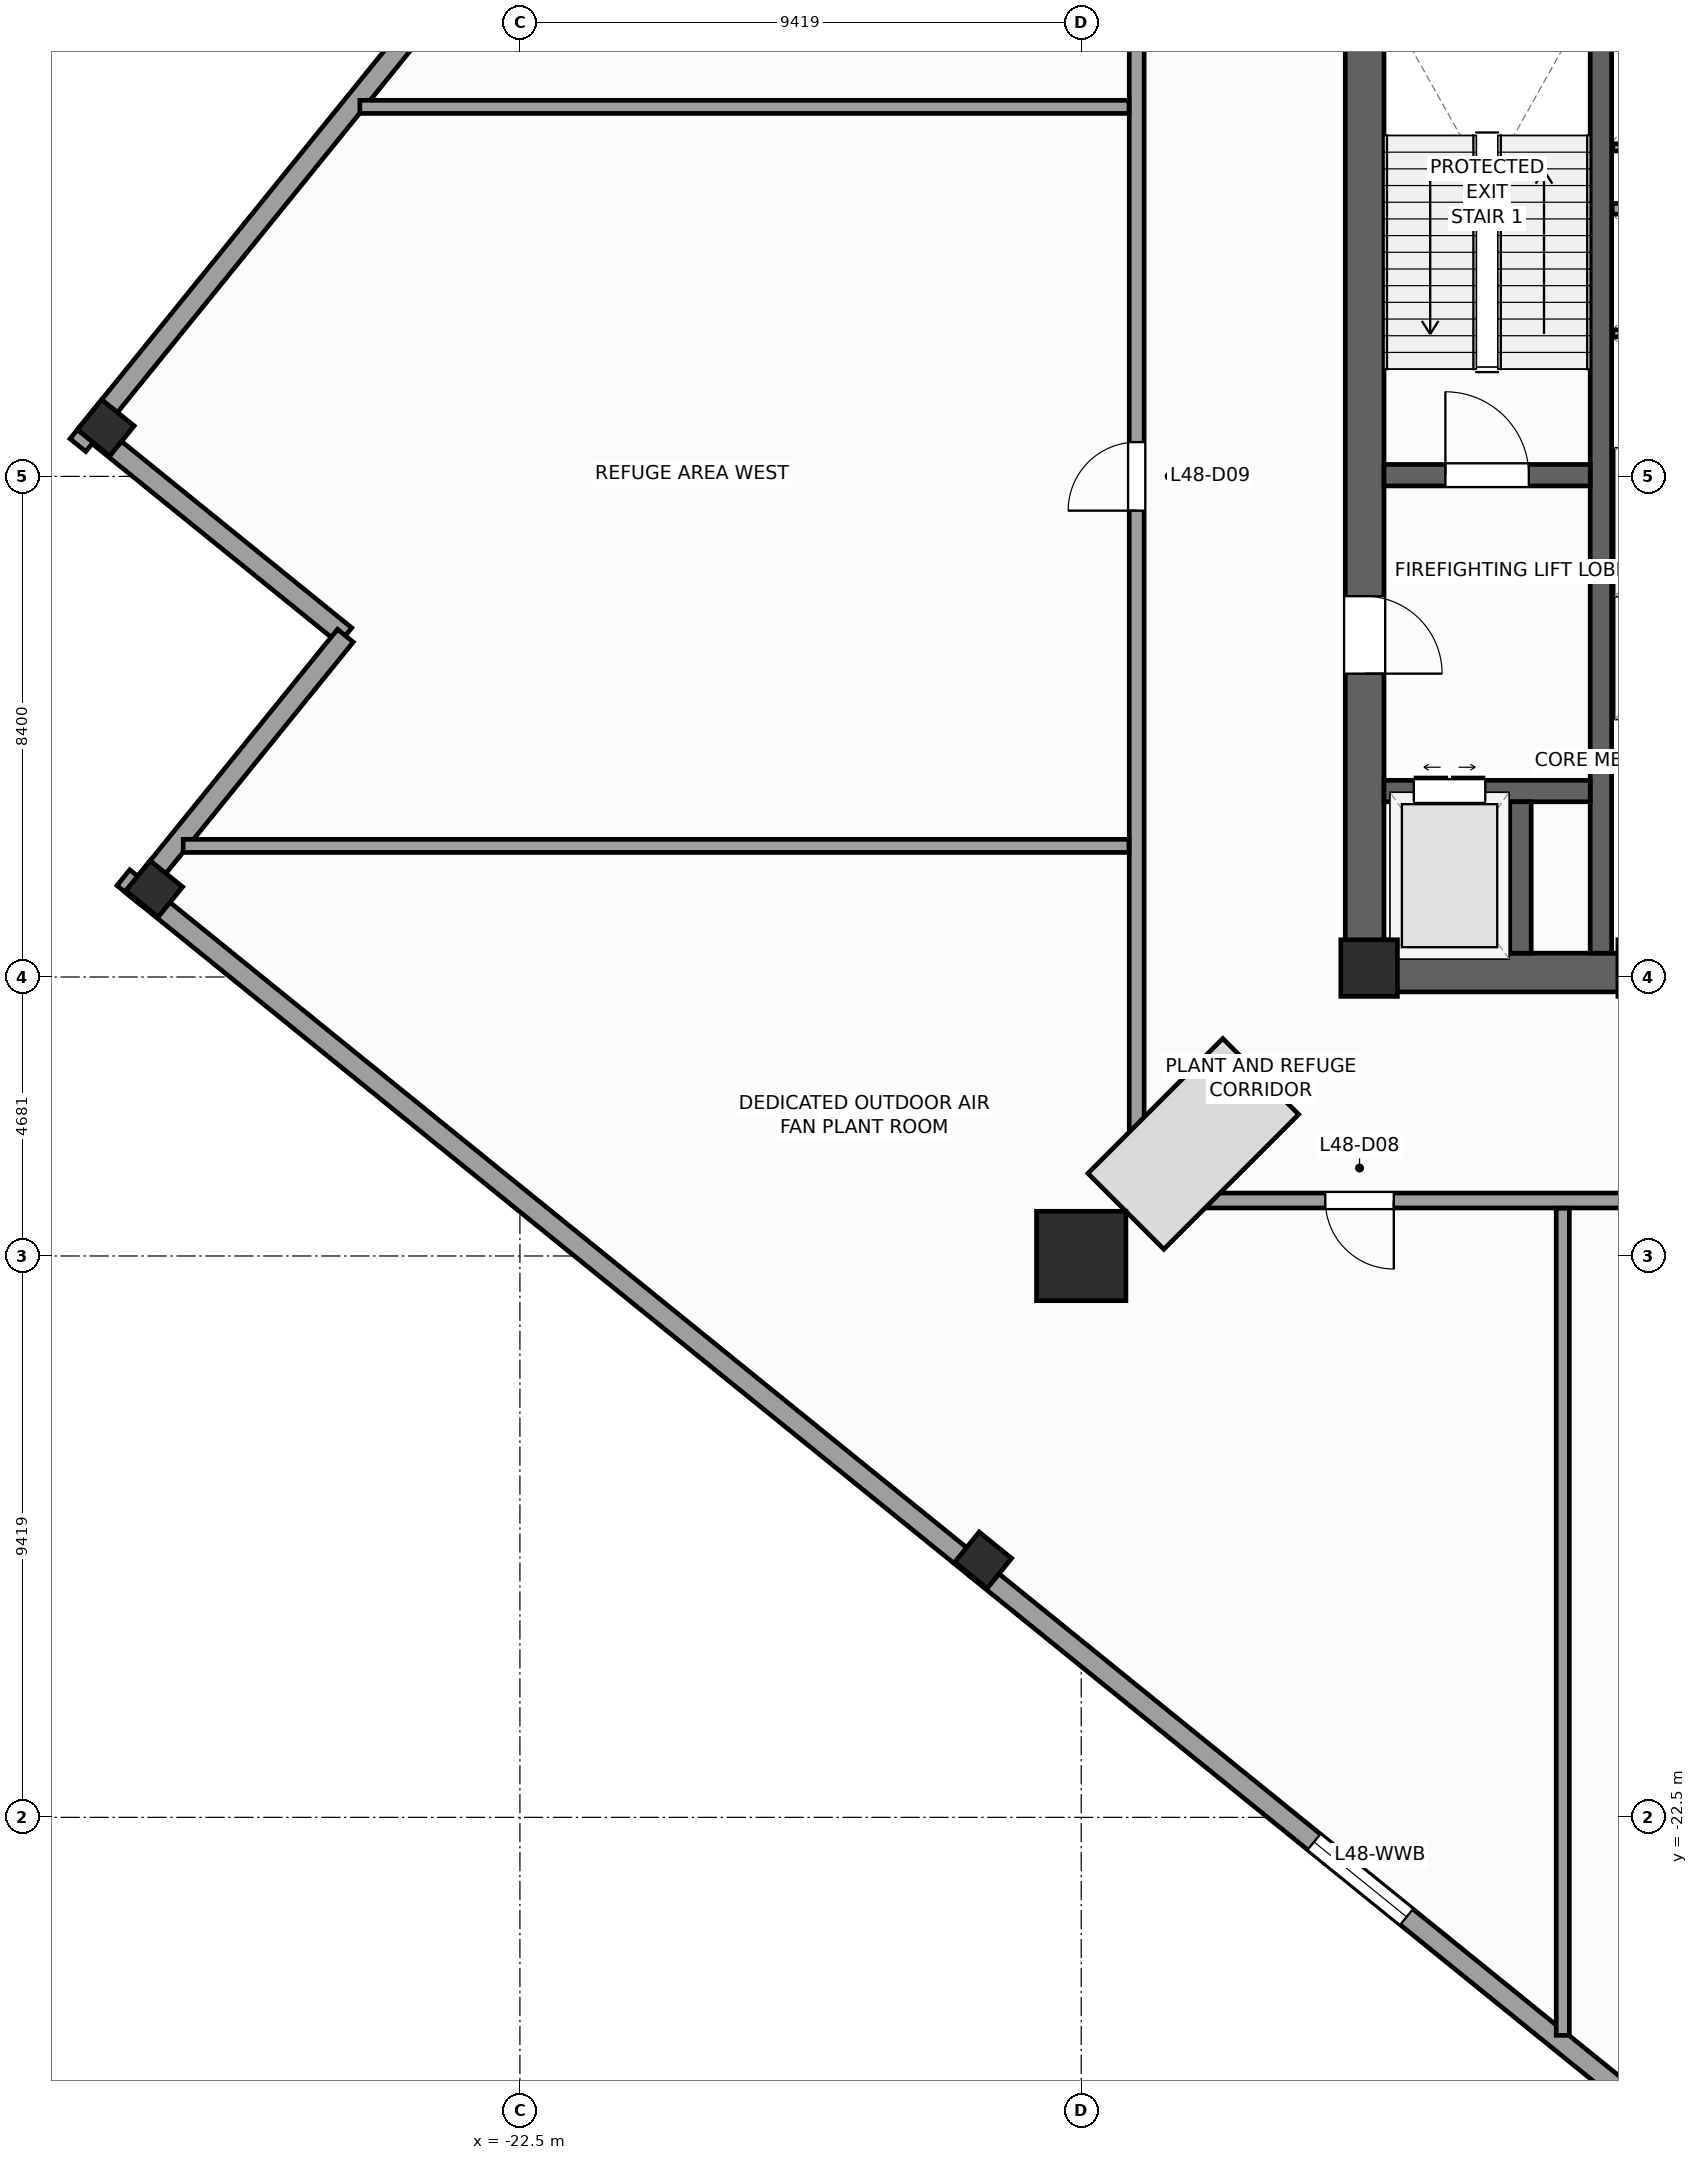
"""IFC4 building model, lengths in metres.
Left out: names, types, materials, properties, quantities, classifications, styles, units other than length and angle.
Written with IfcOpenShell. Run it as: python <this file> out.ifc"""

import sys

from ifc_helpers import new_model, si_unit, direction, frame, frame_2d, origin, origin_2d, place, context, subcontext, project, spatial, rectangle, extrude, source, transform, mapped, element, fill, save


model = new_model("IFC4")
c1 = context("Model", 3, precision=1e-05, world=origin(), true_north=direction((0.0, 1.0)))
c2 = subcontext(c1, "Body", "Model", "MODEL_VIEW")
j1 = project(units=[si_unit("LENGTHUNIT", "METRE"), si_unit("PLANEANGLEUNIT", "RADIAN")], contexts=[c1])
p1 = place(None, origin())
s1 = spatial("IfcSite", under=j1, at=p1, CompositionType="ELEMENT")
p2 = place(p1, origin())
s2 = spatial("IfcBuilding", under=s1, at=p2, CompositionType="ELEMENT")
p3 = place(p2, frame((0.0, 0.0, 200.4)))
s3 = spatial("IfcBuildingStorey", under=s2, at=p3, CompositionType="ELEMENT", Elevation=200.4)
p4 = place(p3, frame((-8.65, -8.325, 0.0), z_axis=(0.0, 0.0, 1.0), x_axis=(1.0, 0.0, 0.0)))
e1 = element("IfcWall", 1, at=p4, inside=s3, PredefinedType="SHEAR", context=c2, shape_type="SweptSolid", body=[
    extrude(rectangle(XDim=17.3, YDim=0.65, at=frame_2d((8.65, 0.0))), origin(), (0.0, 0.0, 1.0), 5.2),
])
p5 = place(p4, frame((8.0, 0.0, 0.0)))
e2 = element("IfcOpeningElement", 2, at=p5, cuts=e1, PredefinedType="OPENING", context=c2, shape_type="SweptSolid", body=[
    extrude(rectangle(XDim=1.3, YDim=2.2, at=frame_2d((0.65, 1.1))), frame((0.0, 0.335, 0.0), z_axis=(0.0, -1.0, 0.0), x_axis=(1.0, 0.0, 0.0)), (0.0, 0.0, 1.0), 0.67),
])
p6 = place(p3, frame((-8.325, -8.0, 0.0), z_axis=(0.0, 0.0, 1.0), x_axis=(0.0, 1.0, 0.0)))
e3 = element("IfcWall", 3, at=p6, inside=s3, PredefinedType="SHEAR", context=c2, shape_type="SweptSolid", body=[
    extrude(rectangle(XDim=16.0, YDim=0.65, at=frame_2d((8.0, 0.0))), origin(), (0.0, 0.0, 1.0), 5.2),
])
p7 = place(p6, frame((4.69, 0.0, 0.0)))
e4 = element("IfcOpeningElement", 4, at=p7, cuts=e3, PredefinedType="OPENING", context=c2, shape_type="SweptSolid", body=[
    extrude(rectangle(XDim=1.3, YDim=2.2, at=frame_2d((0.65, 1.1))), frame((0.0, 0.335, 0.0), z_axis=(0.0, -1.0, 0.0), x_axis=(1.0, 0.0, 0.0)), (0.0, 0.0, 1.0), 0.67),
])
p8 = place(p3, frame((-4.36, -8.0, 0.0), z_axis=(0.0, 0.0, 1.0), x_axis=(0.0, 1.0, 0.0)))
e5 = element("IfcWall", 5, at=p8, inside=s3, PredefinedType="SHEAR", context=c2, shape_type="SweptSolid", body=[
    extrude(rectangle(XDim=16.0, YDim=0.36, at=frame_2d((8.0, 0.0))), origin(), (0.0, 0.0, 1.0), 5.2),
])
p9 = place(p3, frame((-8.0, 0.02, 0.0), z_axis=(0.0, 0.0, 1.0), x_axis=(1.0, 0.0, 0.0)))
e6 = element("IfcWall", 6, at=p9, inside=s3, PredefinedType="SHEAR", context=c2, shape_type="SweptSolid", body=[
    extrude(rectangle(XDim=3.46, YDim=0.36, at=frame_2d((1.73, 0.0))), origin(), (0.0, 0.0, 1.0), 5.2),
])
p10 = place(p9, frame((1.03, 0.0, 0.0)))
e7 = element("IfcOpeningElement", 7, at=p10, cuts=e6, PredefinedType="OPENING", context=c2, shape_type="SweptSolid", body=[
    extrude(rectangle(XDim=1.4, YDim=2.2, at=frame_2d((0.7, 1.1))), frame((0.0, 0.19, 0.0), z_axis=(0.0, -1.0, 0.0), x_axis=(1.0, 0.0, 0.0)), (0.0, 0.0, 1.0), 0.38),
])
p11 = place(p3, frame((-8.0, -5.28, 0.0), z_axis=(0.0, 0.0, 1.0), x_axis=(1.0, 0.0, 0.0)))
e8 = element("IfcWall", 8, at=p11, inside=s3, PredefinedType="SHEAR", context=c2, shape_type="SweptSolid", body=[
    extrude(rectangle(XDim=3.46, YDim=0.36, at=frame_2d((1.73, 0.0))), origin(), (0.0, 0.0, 1.0), 5.2),
])
p12 = place(p11, frame((0.5, 0.0, 0.0)))
e9 = element("IfcOpeningElement", 9, at=p12, cuts=e8, PredefinedType="OPENING", context=c2, shape_type="SweptSolid", body=[
    extrude(rectangle(XDim=1.2, YDim=2.25, at=frame_2d((0.6, 1.125))), frame((0.0, 0.19, 0.0), z_axis=(0.0, -1.0, 0.0), x_axis=(1.0, 0.0, 0.0)), (0.0, 0.0, 1.0), 0.38),
])
p13 = place(p3, frame((-5.71, -8.0, 0.0), z_axis=(0.0, 0.0, 1.0), x_axis=(0.0, 1.0, 0.0)))
e10 = element("IfcWall", 10, at=p13, inside=s3, PredefinedType="SHEAR", context=c2, shape_type="SweptSolid", body=[
    extrude(rectangle(XDim=2.54, YDim=0.36, at=frame_2d((1.27, 0.0))), origin(), (0.0, 0.0, 1.0), 5.2),
])
m1 = source(origin(), c2, "Body", "SweptSolid", [
    extrude(rectangle(XDim=0.95, YDim=0.95, at=origin_2d()), origin(), (0.0, 0.0, 1.0), 5.2),
])
p14 = place(p3, frame((-8.25, -8.25, 0.0), z_axis=(0.0, 0.0, 1.0), x_axis=(1.0, 0.0, 0.0)))
e11 = element("IfcColumn", 11, at=p14, inside=s3, PredefinedType="PILASTER", context=c2, shape_type="MappedRepresentation", body=[
    mapped(m1, transform((0.0, 0.0, 0.0), scale=1.0)),
])
m2 = source(origin(), c2, "Body", "SweptSolid", [
    extrude(rectangle(XDim=1.5, YDim=1.5, at=origin_2d()), origin(), (0.0, 0.0, 1.0), 5.2),
])
p15 = place(p3, frame((-13.081, -13.081, 0.0), z_axis=(0.0, 0.0, 1.0), x_axis=(1.0, 0.0, 0.0)))
e12 = element("IfcColumn", 12, at=p15, inside=s3, PredefinedType="COLUMN", context=c2, shape_type="MappedRepresentation", body=[
    mapped(m2, transform((0.0, 0.0, 0.0), scale=1.0)),
])
m3 = source(origin(), c2, "Body", "SweptSolid", [
    extrude(rectangle(XDim=0.65, YDim=0.7, at=origin_2d()), origin(), (0.0, 0.0, 1.0), 5.2),
])
for number, where, z_axis, x_axis in (
    (13, (-29.45, 0.815, 0.0), (0.0, 0.0, 1.0), (0.629, 0.777, 0.0)),
    (14, (-28.637, -6.92, 0.0), (0.0, 0.0, 1.0), (0.629, 0.777, 0.0)),
    (15, (-14.726, -18.185, 0.0), (0.0, 0.0, 1.0), (0.629, 0.777, 0.0)),
):
    element("IfcColumn", number, at=place(p3, frame(where, z_axis=z_axis, x_axis=x_axis)), inside=s3, PredefinedType="COLUMN", context=c2, shape_type="MappedRepresentation", body=[
        mapped(m3, transform((0.0, 0.0, 0.0), scale=1.0)),
    ])
p16 = place(p3, frame((-29.703, 0.789, 0.0), z_axis=(0.0, 0.0, 1.0), x_axis=(0.77714355312, -0.629323365087, 0.0)))
e16 = element("IfcWall", 16, at=p16, inside=s3, PredefinedType="STANDARD", context=c2, shape_type="SweptSolid", body=[
    extrude(rectangle(XDim=5.5, YDim=0.34, at=frame_2d((2.75, 0.0))), origin(), (0.0, 0.0, 1.0), 4.96),
])
p17 = place(p3, frame((-25.429, -2.673, 0.0), z_axis=(0.0, 0.0, 1.0), x_axis=(-0.629299794138, -0.777162640055, 0.0)))
e17 = element("IfcWall", 17, at=p17, inside=s3, PredefinedType="STANDARD", context=c2, shape_type="SweptSolid", body=[
    extrude(rectangle(XDim=5.67, YDim=0.34, at=frame_2d((2.835, 0.0))), origin(), (0.0, 0.0, 1.0), 4.96),
])
p18 = place(p3, frame((-17.696, 15.616, 0.0), z_axis=(0.0, 0.0, 1.0), x_axis=(-0.629324798011, -0.777142392749, 0.0)))
e18 = element("IfcWall", 18, at=p18, inside=s3, PredefinedType="STANDARD", context=c2, shape_type="SweptSolid", body=[
    extrude(rectangle(XDim=19.42, YDim=0.34, at=frame_2d((9.71, 0.0))), origin(), (0.0, 0.0, 1.0), 4.26),
])
p19 = place(p18, frame((7.739, 0.0, 0.65)))
e19 = element("IfcOpeningElement", 19, at=p19, cuts=e18, PredefinedType="OPENING", context=c2, shape_type="SweptSolid", body=[
    extrude(rectangle(XDim=2.0, YDim=1.45, at=frame_2d((1.0, 0.725))), frame((0.0, 0.18, 0.0), z_axis=(0.0, -1.0, 0.0), x_axis=(1.0, 0.0, 0.0)), (0.0, 0.0, 1.0), 0.36),
])
p20 = place(p3, frame((-29.154, -6.733, 0.0), z_axis=(0.0, 0.0, 1.0), x_axis=(0.777138681893, -0.629329380456, 0.0)))
e20 = element("IfcWall", 20, at=p20, inside=s3, PredefinedType="STANDARD", context=c2, shape_type="SweptSolid", body=[
    extrude(rectangle(XDim=18.42, YDim=0.34, at=frame_2d((9.21, 0.0))), origin(), (0.0, 0.0, 1.0), 4.26),
])
p21 = place(p3, frame((-14.839, -18.325, 0.0), z_axis=(0.0, 0.0, 1.0), x_axis=(0.777145164153, -0.629321375637, 0.0)))
e21 = element("IfcWall", 21, at=p21, inside=s3, PredefinedType="STANDARD", context=c2, shape_type="SweptSolid", body=[
    extrude(rectangle(XDim=18.42, YDim=0.34, at=frame_2d((9.21, 0.0))), origin(), (0.0, 0.0, 1.0), 4.26),
])
p22 = place(p21, frame((7.289, 0.0, 0.65)))
e22 = element("IfcOpeningElement", 22, at=p22, cuts=e21, PredefinedType="OPENING", context=c2, shape_type="SweptSolid", body=[
    extrude(rectangle(XDim=2.0, YDim=1.45, at=frame_2d((1.0, 0.725))), frame((0.0, 0.18, 0.0), z_axis=(0.0, -1.0, 0.0), x_axis=(1.0, 0.0, 0.0)), (0.0, 0.0, 1.0), 0.36),
])
for number, where, z_axis, x_axis in (
    (23, (-4.17, -3.9, 0.0), (0.0, 0.0, 1.0), (1.0, 0.0, 0.0)),
    (24, (-4.17, 0.3, 0.0), (0.0, 0.0, 1.0), (1.0, 0.0, 0.0)),
    (25, (-4.17, 4.49, 0.0), (0.0, 0.0, 1.0), (1.0, 0.0, 0.0)),
):
    element("IfcWall", number, at=place(p3, frame(where, z_axis=z_axis, x_axis=x_axis)), inside=s3, PredefinedType="PARTITIONING", context=c2, shape_type="SweptSolid", body=[
        extrude(rectangle(XDim=2.28, YDim=0.18, at=frame_2d((1.14, 0.0))), origin(), (0.0, 0.0, 1.0), 4.96),
    ])
for number, where, z_axis, x_axis in (
    (26, (-4.16, -1.8, 0.0), (0.0, 0.0, 1.0), (1.0, 0.0, 0.0)),
    (27, (-4.16, 2.4, 0.0), (0.0, 0.0, 1.0), (1.0, 0.0, 0.0)),
):
    element("IfcWall", number, at=place(p3, frame(where, z_axis=z_axis, x_axis=x_axis)), inside=s3, PredefinedType="PARTITIONING", context=c2, shape_type="SweptSolid", body=[
        extrude(rectangle(XDim=2.26, YDim=0.12, at=frame_2d((1.13, 0.0))), origin(), (0.0, 0.0, 1.0), 4.96),
    ])
p23 = place(p3, frame((-4.16, 5.52, 0.0), z_axis=(0.0, 0.0, 1.0), x_axis=(1.0, 0.0, 0.0)))
e28 = element("IfcWall", 28, at=p23, inside=s3, PredefinedType="PARTITIONING", context=c2, shape_type="SweptSolid", body=[
    extrude(rectangle(XDim=2.1, YDim=0.12, at=frame_2d((1.05, 0.0))), origin(), (0.0, 0.0, 1.0), 4.96),
])
p24 = place(p3, frame((-12.15, -12.15, 0.0), z_axis=(0.0, 0.0, 1.0), x_axis=(1.0, 0.0, 0.0)))
e29 = element("IfcWall", 29, at=p24, inside=s3, PredefinedType="PARTITIONING", context=c2, shape_type="SweptSolid", body=[
    extrude(rectangle(XDim=22.9, YDim=0.25, at=frame_2d((11.45, 0.0))), origin(), (0.0, 0.0, 1.0), 4.96),
])
p25 = place(p24, frame((19.036, 0.0, 0.0)))
e30 = element("IfcOpeningElement", 30, at=p25, cuts=e29, PredefinedType="OPENING", context=c2, shape_type="SweptSolid", body=[
    extrude(rectangle(XDim=1.15, YDim=2.25, at=frame_2d((0.575, 1.125))), frame((0.0, 0.135, 0.0), z_axis=(0.0, -1.0, 0.0), x_axis=(1.0, 0.0, 0.0)), (0.0, 0.0, 1.0), 0.27),
])
p26 = place(p24, frame((13.825, 0.0, 0.0)))
e31 = element("IfcOpeningElement", 31, at=p26, cuts=e29, PredefinedType="OPENING", context=c2, shape_type="SweptSolid", body=[
    extrude(rectangle(XDim=1.15, YDim=2.25, at=frame_2d((0.575, 1.125))), frame((0.0, 0.135, 0.0), z_axis=(0.0, -1.0, 0.0), x_axis=(1.0, 0.0, 0.0)), (0.0, 0.0, 1.0), 0.27),
])
p27 = place(p24, frame((9.075, 0.0, 0.0)))
e32 = element("IfcOpeningElement", 32, at=p27, cuts=e29, PredefinedType="OPENING", context=c2, shape_type="SweptSolid", body=[
    extrude(rectangle(XDim=1.15, YDim=2.25, at=frame_2d((0.575, 1.125))), frame((0.0, 0.135, 0.0), z_axis=(0.0, -1.0, 0.0), x_axis=(1.0, 0.0, 0.0)), (0.0, 0.0, 1.0), 0.27),
])
p28 = place(p24, frame((3.165, 0.0, 0.0)))
e33 = element("IfcOpeningElement", 33, at=p28, cuts=e29, PredefinedType="OPENING", context=c2, shape_type="SweptSolid", body=[
    extrude(rectangle(XDim=1.15, YDim=2.25, at=frame_2d((0.575, 1.125))), frame((0.0, 0.135, 0.0), z_axis=(0.0, -1.0, 0.0), x_axis=(1.0, 0.0, 0.0)), (0.0, 0.0, 1.0), 0.27),
])
p29 = place(p3, frame((-12.15, -12.05, 0.0), z_axis=(0.0, 0.0, 1.0), x_axis=(0.0, 1.0, 0.0)))
e34 = element("IfcWall", 34, at=p29, inside=s3, PredefinedType="PARTITIONING", context=c2, shape_type="SweptSolid", body=[
    extrude(rectangle(XDim=24.1, YDim=0.25, at=frame_2d((12.05, 0.0))), origin(), (0.0, 0.0, 1.0), 4.96),
])
p30 = place(p29, frame((11.475, 0.0, 0.0)))
e35 = element("IfcOpeningElement", 35, at=p30, cuts=e34, PredefinedType="OPENING", context=c2, shape_type="SweptSolid", body=[
    extrude(rectangle(XDim=1.15, YDim=2.25, at=frame_2d((0.575, 1.125))), frame((0.0, 0.135, 0.0), z_axis=(0.0, -1.0, 0.0), x_axis=(1.0, 0.0, 0.0)), (0.0, 0.0, 1.0), 0.27),
])
p31 = place(p3, frame((-5.0, -12.28, 0.0), z_axis=(0.0, 0.0, 1.0), x_axis=(0.0, -1.0, 0.0)))
e36 = element("IfcWall", 36, at=p31, inside=s3, PredefinedType="PARTITIONING", context=c2, shape_type="SweptSolid", body=[
    extrude(rectangle(XDim=13.878, YDim=0.22, at=frame_2d((6.939, 0.0))), origin(), (0.0, 0.0, 1.0), 4.96),
])
p32 = place(p3, frame((-12.28, -6.2, 0.0), z_axis=(0.0, 0.0, 1.0), x_axis=(-1.0, 0.0, 0.0)))
e37 = element("IfcWall", 37, at=p32, inside=s3, PredefinedType="PARTITIONING", context=c2, shape_type="SweptSolid", body=[
    extrude(rectangle(XDim=15.87, YDim=0.22, at=frame_2d((7.935, 0.0))), origin(), (0.0, 0.0, 1.0), 4.96),
])
p33 = place(p3, frame((-12.28, 6.2, 0.0), z_axis=(0.0, 0.0, 1.0), x_axis=(-1.0, 0.0, 0.0)))
e38 = element("IfcWall", 38, at=p33, inside=s3, PredefinedType="PARTITIONING", context=c2, shape_type="SweptSolid", body=[
    extrude(rectangle(XDim=12.906, YDim=0.22, at=frame_2d((6.453, 0.0))), origin(), (0.0, 0.0, 1.0), 4.96),
])
m4 = source(origin(), c2, "Body", "SweptSolid", [
    extrude(rectangle(XDim=2.0, YDim=1.45, at=frame_2d((1.0, 0.725))), frame((0.0, 0.03, 0.0), z_axis=(0.0, -1.0, 0.0), x_axis=(1.0, 0.0, 0.0)), (0.0, 0.0, 1.0), 0.06),
])
p34 = place(p22, origin())
e39 = element("IfcWindow", 39, at=p34, inside=s3, PartitioningType="SINGLE_PANEL", PredefinedType="WINDOW", context=c2, shape_type="MappedRepresentation", body=[
    mapped(m4, transform((0.0, 0.0, 0.0), scale=1.0)),
])
fill(e22, e39)
m5 = source(origin(), c2, "Body", "SweptSolid", [
    extrude(rectangle(XDim=1.4, YDim=2.2, at=frame_2d((0.7, 1.1))), frame((0.0, 0.025, 0.0), z_axis=(0.0, -1.0, 0.0), x_axis=(1.0, 0.0, 0.0)), (0.0, 0.0, 1.0), 0.05),
])
p35 = place(p10, origin())
e40 = element("IfcDoor", 40, at=p35, inside=s3, OperationType="SINGLE_SWING_LEFT", PredefinedType="DOOR", context=c2, shape_type="MappedRepresentation", body=[
    mapped(m5, transform((0.0, 0.0, 0.0), scale=1.0)),
])
fill(e7, e40)
m6 = source(origin(), c2, "Body", "SweptSolid", [
    extrude(rectangle(XDim=1.3, YDim=2.2, at=frame_2d((0.65, 1.1))), frame((0.0, 0.025, 0.0), z_axis=(0.0, -1.0, 0.0), x_axis=(1.0, 0.0, 0.0)), (0.0, 0.0, 1.0), 0.05),
])
p36 = place(p7, frame((1.3, 0.0, 0.0), z_axis=(0.0, 0.0, 1.0), x_axis=(-1.0, 0.0, 0.0)))
e41 = element("IfcDoor", 41, at=p36, inside=s3, OperationType="SINGLE_SWING_LEFT", PredefinedType="DOOR", context=c2, shape_type="MappedRepresentation", body=[
    mapped(m6, transform((0.0, 0.0, 0.0), scale=1.0)),
])
fill(e4, e41)
m7 = source(origin(), c2, "Body", "SweptSolid", [
    extrude(rectangle(XDim=1.2, YDim=2.25, at=frame_2d((0.6, 1.125))), frame((0.0, 0.025, 0.0), z_axis=(0.0, -1.0, 0.0), x_axis=(1.0, 0.0, 0.0)), (0.0, 0.0, 1.0), 0.05),
])
p37 = place(p12, origin())
e42 = element("IfcDoor", 42, at=p37, inside=s3, OperationType="DOUBLE_DOOR_SLIDING", PredefinedType="DOOR", context=c2, shape_type="MappedRepresentation", body=[
    mapped(m7, transform((0.0, 0.0, 0.0), scale=1.0)),
])
fill(e9, e42)
m8 = source(origin(), c2, "Body", "SweptSolid", [
    extrude(rectangle(XDim=1.15, YDim=2.25, at=frame_2d((0.575, 1.125))), frame((0.0, 0.025, 0.0), z_axis=(0.0, -1.0, 0.0), x_axis=(1.0, 0.0, 0.0)), (0.0, 0.0, 1.0), 0.05),
])
p38 = place(p28, frame((1.15, 0.0, 0.0), z_axis=(0.0, 0.0, 1.0), x_axis=(-1.0, 0.0, 0.0)))
e43 = element("IfcDoor", 43, at=p38, inside=s3, OperationType="SINGLE_SWING_RIGHT", PredefinedType="DOOR", context=c2, shape_type="MappedRepresentation", body=[
    mapped(m8, transform((0.0, 0.0, 0.0), scale=1.0)),
])
fill(e33, e43)
p39 = place(p30, origin())
e44 = element("IfcDoor", 44, at=p39, inside=s3, OperationType="SINGLE_SWING_LEFT", PredefinedType="DOOR", context=c2, shape_type="MappedRepresentation", body=[
    mapped(m8, transform((0.0, 0.0, 0.0), scale=1.0)),
])
fill(e35, e44)
save(model, sys.argv[1])
